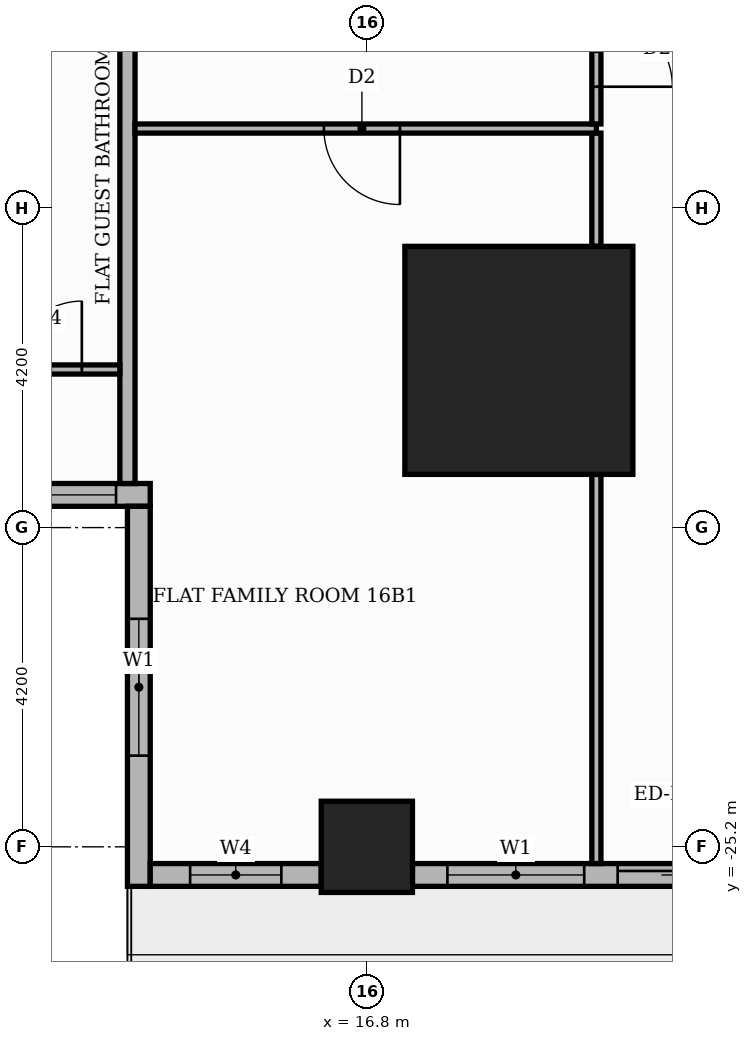
"""IFC4 building model, lengths in metres.
Left out: names, types, materials, properties, quantities, classifications, styles, units other than length and angle.
Written with IfcOpenShell. Run it as: python <this file> out.ifc"""

import sys

from ifc_helpers import new_model, si_unit, direction, frame, frame_2d, origin, origin_2d, place, context, subcontext, project, spatial, rectangle, extrude, element, fill, save


model = new_model("IFC4")
c1 = context("Model", 3, precision=1e-05, world=origin(), true_north=direction((0.0, 1.0)))
c2 = subcontext(c1, "Body", "Model", "MODEL_VIEW")
j1 = project(units=[si_unit("LENGTHUNIT", "METRE"), si_unit("PLANEANGLEUNIT", "RADIAN")], contexts=[c1])
p1 = place(None, origin())
s1 = spatial("IfcSite", under=j1, at=p1, CompositionType="ELEMENT")
p2 = place(p1, origin())
s2 = spatial("IfcBuilding", under=s1, at=p2, CompositionType="ELEMENT")
p3 = place(p2, frame((0.0, 0.0, 69.9)))
s3 = spatial("IfcBuildingStorey", under=s2, at=p3, CompositionType="ELEMENT", Elevation=69.9)
p4 = place(p3, frame((18.8, -18.8, 0.0), z_axis=(0.0, 0.0, 1.0), x_axis=(1.0, 0.0, 0.0)))
e1 = element("IfcColumn", 1, at=p4, inside=s3, PredefinedType="COLUMN", context=c2, shape_type="SweptSolid", body=[
    extrude(rectangle(XDim=3.0, YDim=3.0, at=origin_2d()), origin(), (0.0, 0.0, 1.0), 3.9),
])
p5 = place(p3, frame((16.8, -25.2, 0.0), z_axis=(0.0, 0.0, 1.0), x_axis=(1.0, 0.0, 0.0)))
e2 = element("IfcColumn", 2, at=p5, inside=s3, PredefinedType="COLUMN", context=c2, shape_type="SweptSolid", body=[
    extrude(rectangle(XDim=1.2, YDim=1.2, at=origin_2d()), origin(), (0.0, 0.0, 1.0), 3.9),
])
p6 = place(p3, frame((-13.65, -20.57, 0.0), z_axis=(0.0, 0.0, 1.0), x_axis=(1.0, 0.0, 0.0)))
e3 = element("IfcWall", 3, at=p6, inside=s3, PredefinedType="STANDARD", context=c2, shape_type="SweptSolid", body=[
    extrude(rectangle(XDim=27.6, YDim=0.3, at=frame_2d((13.8, 0.0))), origin(), (0.0, 0.0, 1.0), 3.4),
])
p7 = place(p6, frame((0.15, 0.0, 0.9)))
e4 = element("IfcOpeningElement", 4, at=p7, cuts=e3, PredefinedType="OPENING", context=c2, shape_type="SweptSolid", body=[
    extrude(rectangle(XDim=6.0, YDim=2.1, at=frame_2d((3.0, 1.05))), frame((0.0, 0.16, 0.0), z_axis=(0.0, -1.0, 0.0), x_axis=(1.0, 0.0, 0.0)), (0.0, 0.0, 1.0), 0.32),
])
p8 = place(p6, frame((6.45, 0.0, 0.9)))
e5 = element("IfcOpeningElement", 5, at=p8, cuts=e3, PredefinedType="OPENING", context=c2, shape_type="SweptSolid", body=[
    extrude(rectangle(XDim=1.8, YDim=2.1, at=frame_2d((0.9, 1.05))), frame((0.0, 0.16, 0.0), z_axis=(0.0, -1.0, 0.0), x_axis=(1.0, 0.0, 0.0)), (0.0, 0.0, 1.0), 0.32),
])
p9 = place(p6, frame((8.55, 0.0, 0.9)))
e6 = element("IfcOpeningElement", 6, at=p9, cuts=e3, PredefinedType="OPENING", context=c2, shape_type="SweptSolid", body=[
    extrude(rectangle(XDim=6.0, YDim=2.1, at=frame_2d((3.0, 1.05))), frame((0.0, 0.16, 0.0), z_axis=(0.0, -1.0, 0.0), x_axis=(1.0, 0.0, 0.0)), (0.0, 0.0, 1.0), 0.32),
])
p10 = place(p6, frame((14.85, 0.0, 0.9)))
e7 = element("IfcOpeningElement", 7, at=p10, cuts=e3, PredefinedType="OPENING", context=c2, shape_type="SweptSolid", body=[
    extrude(rectangle(XDim=6.0, YDim=2.1, at=frame_2d((3.0, 1.05))), frame((0.0, 0.16, 0.0), z_axis=(0.0, -1.0, 0.0), x_axis=(1.0, 0.0, 0.0)), (0.0, 0.0, 1.0), 0.32),
])
p11 = place(p6, frame((21.15, 0.0, 0.9)))
e8 = element("IfcOpeningElement", 8, at=p11, cuts=e3, PredefinedType="OPENING", context=c2, shape_type="SweptSolid", body=[
    extrude(rectangle(XDim=6.0, YDim=2.1, at=frame_2d((3.0, 1.05))), frame((0.0, 0.16, 0.0), z_axis=(0.0, -1.0, 0.0), x_axis=(1.0, 0.0, 0.0)), (0.0, 0.0, 1.0), 0.32),
])
p12 = place(p3, frame((13.8, -20.72, 0.0), z_axis=(0.0, 0.0, 1.0), x_axis=(0.0, -1.0, 0.0)))
e9 = element("IfcWall", 9, at=p12, inside=s3, PredefinedType="STANDARD", context=c2, shape_type="SweptSolid", body=[
    extrude(rectangle(XDim=5.0, YDim=0.3, at=frame_2d((2.5, 0.0))), origin(), (0.0, 0.0, 1.0), 3.4),
])
p13 = place(p12, frame((1.48, 0.0, 0.9)))
e10 = element("IfcOpeningElement", 10, at=p13, cuts=e9, PredefinedType="OPENING", context=c2, shape_type="SweptSolid", body=[
    extrude(rectangle(XDim=1.8, YDim=2.1, at=frame_2d((0.9, 1.05))), frame((0.0, 0.16, 0.0), z_axis=(0.0, -1.0, 0.0), x_axis=(1.0, 0.0, 0.0)), (0.0, 0.0, 1.0), 0.32),
])
p14 = place(p3, frame((13.95, -25.57, 0.0), z_axis=(0.0, 0.0, 1.0), x_axis=(1.0, 0.0, 0.0)))
e11 = element("IfcWall", 11, at=p14, inside=s3, PredefinedType="STANDARD", context=c2, shape_type="SweptSolid", body=[
    extrude(rectangle(XDim=2.25, YDim=0.3, at=frame_2d((1.125, 0.0))), origin(), (0.0, 0.0, 1.0), 3.4),
])
p15 = place(p14, frame((0.525, 0.0, 0.9)))
e12 = element("IfcOpeningElement", 12, at=p15, cuts=e11, PredefinedType="OPENING", context=c2, shape_type="SweptSolid", body=[
    extrude(rectangle(XDim=1.2, YDim=2.1, at=frame_2d((0.6, 1.05))), frame((0.0, 0.16, 0.0), z_axis=(0.0, -1.0, 0.0), x_axis=(1.0, 0.0, 0.0)), (0.0, 0.0, 1.0), 0.32),
])
p16 = place(p3, frame((17.4, -25.57, 0.0), z_axis=(0.0, 0.0, 1.0), x_axis=(1.0, 0.0, 0.0)))
e13 = element("IfcWall", 13, at=p16, inside=s3, PredefinedType="STANDARD", context=c2, shape_type="SweptSolid", body=[
    extrude(rectangle(XDim=5.32, YDim=0.3, at=frame_2d((2.66, 0.0))), origin(), (0.0, 0.0, 1.0), 3.4),
])
p17 = place(p16, frame((2.7, 0.0, 0.0)))
e14 = element("IfcOpeningElement", 14, at=p17, cuts=e13, PredefinedType="OPENING", context=c2, shape_type="SweptSolid", body=[
    extrude(rectangle(XDim=1.8, YDim=2.4, at=frame_2d((0.9, 1.2))), frame((0.0, 0.16, 0.0), z_axis=(0.0, -1.0, 0.0), x_axis=(1.0, 0.0, 0.0)), (0.0, 0.0, 1.0), 0.32),
])
p18 = place(p16, frame((0.46, 0.0, 0.9)))
e15 = element("IfcOpeningElement", 15, at=p18, cuts=e13, PredefinedType="OPENING", context=c2, shape_type="SweptSolid", body=[
    extrude(rectangle(XDim=1.8, YDim=2.1, at=frame_2d((0.9, 1.05))), frame((0.0, 0.16, 0.0), z_axis=(0.0, -1.0, 0.0), x_axis=(1.0, 0.0, 0.0)), (0.0, 0.0, 1.0), 0.32),
])
p19 = place(p3, frame((19.82, -25.42, 0.0), z_axis=(0.0, 0.0, 1.0), x_axis=(0.0, 1.0, 0.0)))
e16 = element("IfcWall", 16, at=p19, inside=s3, PredefinedType="PARTITIONING", context=c2, shape_type="SweptSolid", body=[
    extrude(rectangle(XDim=5.12, YDim=0.12, at=frame_2d((2.56, 0.0))), origin(), (0.0, 0.0, 1.0), 3.4),
])
p20 = place(p3, frame((13.65, -20.42, 0.0), z_axis=(0.0, 0.0, 1.0), x_axis=(0.0, 1.0, 0.0)))
e17 = element("IfcWall", 17, at=p20, inside=s3, PredefinedType="PARTITIONING", context=c2, shape_type="SweptSolid", body=[
    extrude(rectangle(XDim=6.67, YDim=0.2, at=frame_2d((3.335, 0.0))), origin(), (0.0, 0.0, 1.0), 3.4),
])
p21 = place(p3, frame((-1.05, -18.92, 0.0), z_axis=(0.0, 0.0, 1.0), x_axis=(1.0, 0.0, 0.0)))
e18 = element("IfcWall", 18, at=p21, inside=s3, PredefinedType="PARTITIONING", context=c2, shape_type="SweptSolid", body=[
    extrude(rectangle(XDim=14.6, YDim=0.12, at=frame_2d((7.3, 0.0))), origin(), (0.0, 0.0, 1.0), 3.4),
])
p22 = place(p21, frame((2.7, 0.0, 0.0)))
e19 = element("IfcOpeningElement", 19, at=p22, cuts=e18, PredefinedType="OPENING", context=c2, shape_type="SweptSolid", body=[
    extrude(rectangle(XDim=0.9, YDim=2.1, at=frame_2d((0.45, 1.05))), frame((0.0, 0.07, 0.0), z_axis=(0.0, -1.0, 0.0), x_axis=(1.0, 0.0, 0.0)), (0.0, 0.0, 1.0), 0.14),
])
p23 = place(p21, frame((6.85, 0.0, 0.0)))
e20 = element("IfcOpeningElement", 20, at=p23, cuts=e18, PredefinedType="OPENING", context=c2, shape_type="SweptSolid", body=[
    extrude(rectangle(XDim=1.0, YDim=2.1, at=frame_2d((0.5, 1.05))), frame((0.0, 0.07, 0.0), z_axis=(0.0, -1.0, 0.0), x_axis=(1.0, 0.0, 0.0)), (0.0, 0.0, 1.0), 0.14),
])
p24 = place(p21, frame((10.05, 0.0, 0.0)))
e21 = element("IfcOpeningElement", 21, at=p24, cuts=e18, PredefinedType="OPENING", context=c2, shape_type="SweptSolid", body=[
    extrude(rectangle(XDim=0.9, YDim=2.1, at=frame_2d((0.45, 1.05))), frame((0.0, 0.07, 0.0), z_axis=(0.0, -1.0, 0.0), x_axis=(1.0, 0.0, 0.0)), (0.0, 0.0, 1.0), 0.14),
])
p25 = place(p21, frame((13.2, 0.0, 0.0)))
e22 = element("IfcOpeningElement", 22, at=p25, cuts=e18, PredefinedType="OPENING", context=c2, shape_type="SweptSolid", body=[
    extrude(rectangle(XDim=0.9, YDim=2.1, at=frame_2d((0.45, 1.05))), frame((0.0, 0.07, 0.0), z_axis=(0.0, -1.0, 0.0), x_axis=(1.0, 0.0, 0.0)), (0.0, 0.0, 1.0), 0.14),
])
p26 = place(p3, frame((19.82, -17.3, 0.0), z_axis=(0.0, 0.0, 1.0), x_axis=(0.0, 1.0, 0.0)))
e23 = element("IfcWall", 23, at=p26, inside=s3, PredefinedType="PARTITIONING", context=c2, shape_type="SweptSolid", body=[
    extrude(rectangle(XDim=1.49, YDim=0.12, at=frame_2d((0.745, 0.0))), origin(), (0.0, 0.0, 1.0), 3.4),
])
p27 = place(p3, frame((13.75, -15.75, 0.0), z_axis=(0.0, 0.0, 1.0), x_axis=(1.0, 0.0, 0.0)))
e24 = element("IfcWall", 24, at=p27, inside=s3, PredefinedType="PARTITIONING", context=c2, shape_type="SweptSolid", body=[
    extrude(rectangle(XDim=6.07, YDim=0.12, at=frame_2d((3.035, 0.0))), origin(), (0.0, 0.0, 1.0), 3.4),
])
p28 = place(p27, frame((2.485, 0.0, 0.0)))
e25 = element("IfcOpeningElement", 25, at=p28, cuts=e24, PredefinedType="OPENING", context=c2, shape_type="SweptSolid", body=[
    extrude(rectangle(XDim=1.0, YDim=2.1, at=frame_2d((0.5, 1.05))), frame((0.0, 0.07, 0.0), z_axis=(0.0, -1.0, 0.0), x_axis=(1.0, 0.0, 0.0)), (0.0, 0.0, 1.0), 0.14),
])
p29 = place(p3, frame((19.82, -15.69, 0.0), z_axis=(0.0, 0.0, 1.0), x_axis=(0.0, 1.0, 0.0)))
e26 = element("IfcWall", 26, at=p29, inside=s3, PredefinedType="PARTITIONING", context=c2, shape_type="SweptSolid", body=[
    extrude(rectangle(XDim=1.98, YDim=0.12, at=frame_2d((0.99, 0.0))), origin(), (0.0, 0.0, 1.0), 3.4),
])
p30 = place(p29, frame((0.49, 0.0, 0.0)))
e27 = element("IfcOpeningElement", 27, at=p30, cuts=e26, PredefinedType="OPENING", context=c2, shape_type="SweptSolid", body=[
    extrude(rectangle(XDim=1.0, YDim=2.1, at=frame_2d((0.5, 1.05))), frame((0.0, 0.07, 0.0), z_axis=(0.0, -1.0, 0.0), x_axis=(1.0, 0.0, 0.0)), (0.0, 0.0, 1.0), 0.14),
])
p31 = place(p11, origin())
e28 = element("IfcWindow", 28, at=p31, inside=s3, PartitioningType="SINGLE_PANEL", PredefinedType="WINDOW", context=c2, shape_type="SweptSolid", body=[
    extrude(rectangle(XDim=6.0, YDim=2.1, at=frame_2d((3.0, 1.05))), frame((0.0, 0.03, 0.0), z_axis=(0.0, -1.0, 0.0), x_axis=(1.0, 0.0, 0.0)), (0.0, 0.0, 1.0), 0.06),
])
fill(e8, e28)
p32 = place(p13, origin())
e29 = element("IfcWindow", 29, at=p32, inside=s3, PartitioningType="SINGLE_PANEL", PredefinedType="WINDOW", context=c2, shape_type="SweptSolid", body=[
    extrude(rectangle(XDim=1.8, YDim=2.1, at=frame_2d((0.9, 1.05))), frame((0.0, 0.03, 0.0), z_axis=(0.0, -1.0, 0.0), x_axis=(1.0, 0.0, 0.0)), (0.0, 0.0, 1.0), 0.06),
])
fill(e10, e29)
p33 = place(p15, origin())
e30 = element("IfcWindow", 30, at=p33, inside=s3, PartitioningType="SINGLE_PANEL", PredefinedType="WINDOW", context=c2, shape_type="SweptSolid", body=[
    extrude(rectangle(XDim=1.2, YDim=2.1, at=frame_2d((0.6, 1.05))), frame((0.0, 0.03, 0.0), z_axis=(0.0, -1.0, 0.0), x_axis=(1.0, 0.0, 0.0)), (0.0, 0.0, 1.0), 0.06),
])
fill(e12, e30)
p34 = place(p17, origin())
e31 = element("IfcDoor", 31, at=p34, inside=s3, OperationType="SLIDING_TO_LEFT", PredefinedType="DOOR", context=c2, shape_type="SweptSolid", body=[
    extrude(rectangle(XDim=1.8, YDim=2.4, at=frame_2d((0.9, 1.2))), frame((0.0, 0.025, 0.0), z_axis=(0.0, -1.0, 0.0), x_axis=(1.0, 0.0, 0.0)), (0.0, 0.0, 1.0), 0.05),
])
fill(e14, e31)
p35 = place(p18, origin())
e32 = element("IfcWindow", 32, at=p35, inside=s3, PartitioningType="SINGLE_PANEL", PredefinedType="WINDOW", context=c2, shape_type="SweptSolid", body=[
    extrude(rectangle(XDim=1.8, YDim=2.1, at=frame_2d((0.9, 1.05))), frame((0.0, 0.03, 0.0), z_axis=(0.0, -1.0, 0.0), x_axis=(1.0, 0.0, 0.0)), (0.0, 0.0, 1.0), 0.06),
])
fill(e15, e32)
p36 = place(p25, origin())
e33 = element("IfcDoor", 33, at=p36, inside=s3, OperationType="SINGLE_SWING_RIGHT", PredefinedType="DOOR", context=c2, shape_type="SweptSolid", body=[
    extrude(rectangle(XDim=0.9, YDim=2.1, at=frame_2d((0.45, 1.05))), frame((0.0, 0.025, 0.0), z_axis=(0.0, -1.0, 0.0), x_axis=(1.0, 0.0, 0.0)), (0.0, 0.0, 1.0), 0.05),
])
fill(e22, e33)
p37 = place(p28, frame((1.0, 0.0, 0.0), z_axis=(0.0, 0.0, 1.0), x_axis=(-1.0, 0.0, 0.0)))
e34 = element("IfcDoor", 34, at=p37, inside=s3, OperationType="SINGLE_SWING_RIGHT", PredefinedType="DOOR", context=c2, shape_type="SweptSolid", body=[
    extrude(rectangle(XDim=1.0, YDim=2.1, at=frame_2d((0.5, 1.05))), frame((0.0, 0.025, 0.0), z_axis=(0.0, -1.0, 0.0), x_axis=(1.0, 0.0, 0.0)), (0.0, 0.0, 1.0), 0.05),
])
fill(e25, e34)
p38 = place(p30, frame((1.0, 0.0, 0.0), z_axis=(0.0, 0.0, 1.0), x_axis=(-1.0, 0.0, 0.0)))
e35 = element("IfcDoor", 35, at=p38, inside=s3, OperationType="SINGLE_SWING_LEFT", PredefinedType="DOOR", context=c2, shape_type="SweptSolid", body=[
    extrude(rectangle(XDim=1.0, YDim=2.1, at=frame_2d((0.5, 1.05))), frame((0.0, 0.025, 0.0), z_axis=(0.0, -1.0, 0.0), x_axis=(1.0, 0.0, 0.0)), (0.0, 0.0, 1.0), 0.05),
])
fill(e27, e35)
save(model, sys.argv[1])
